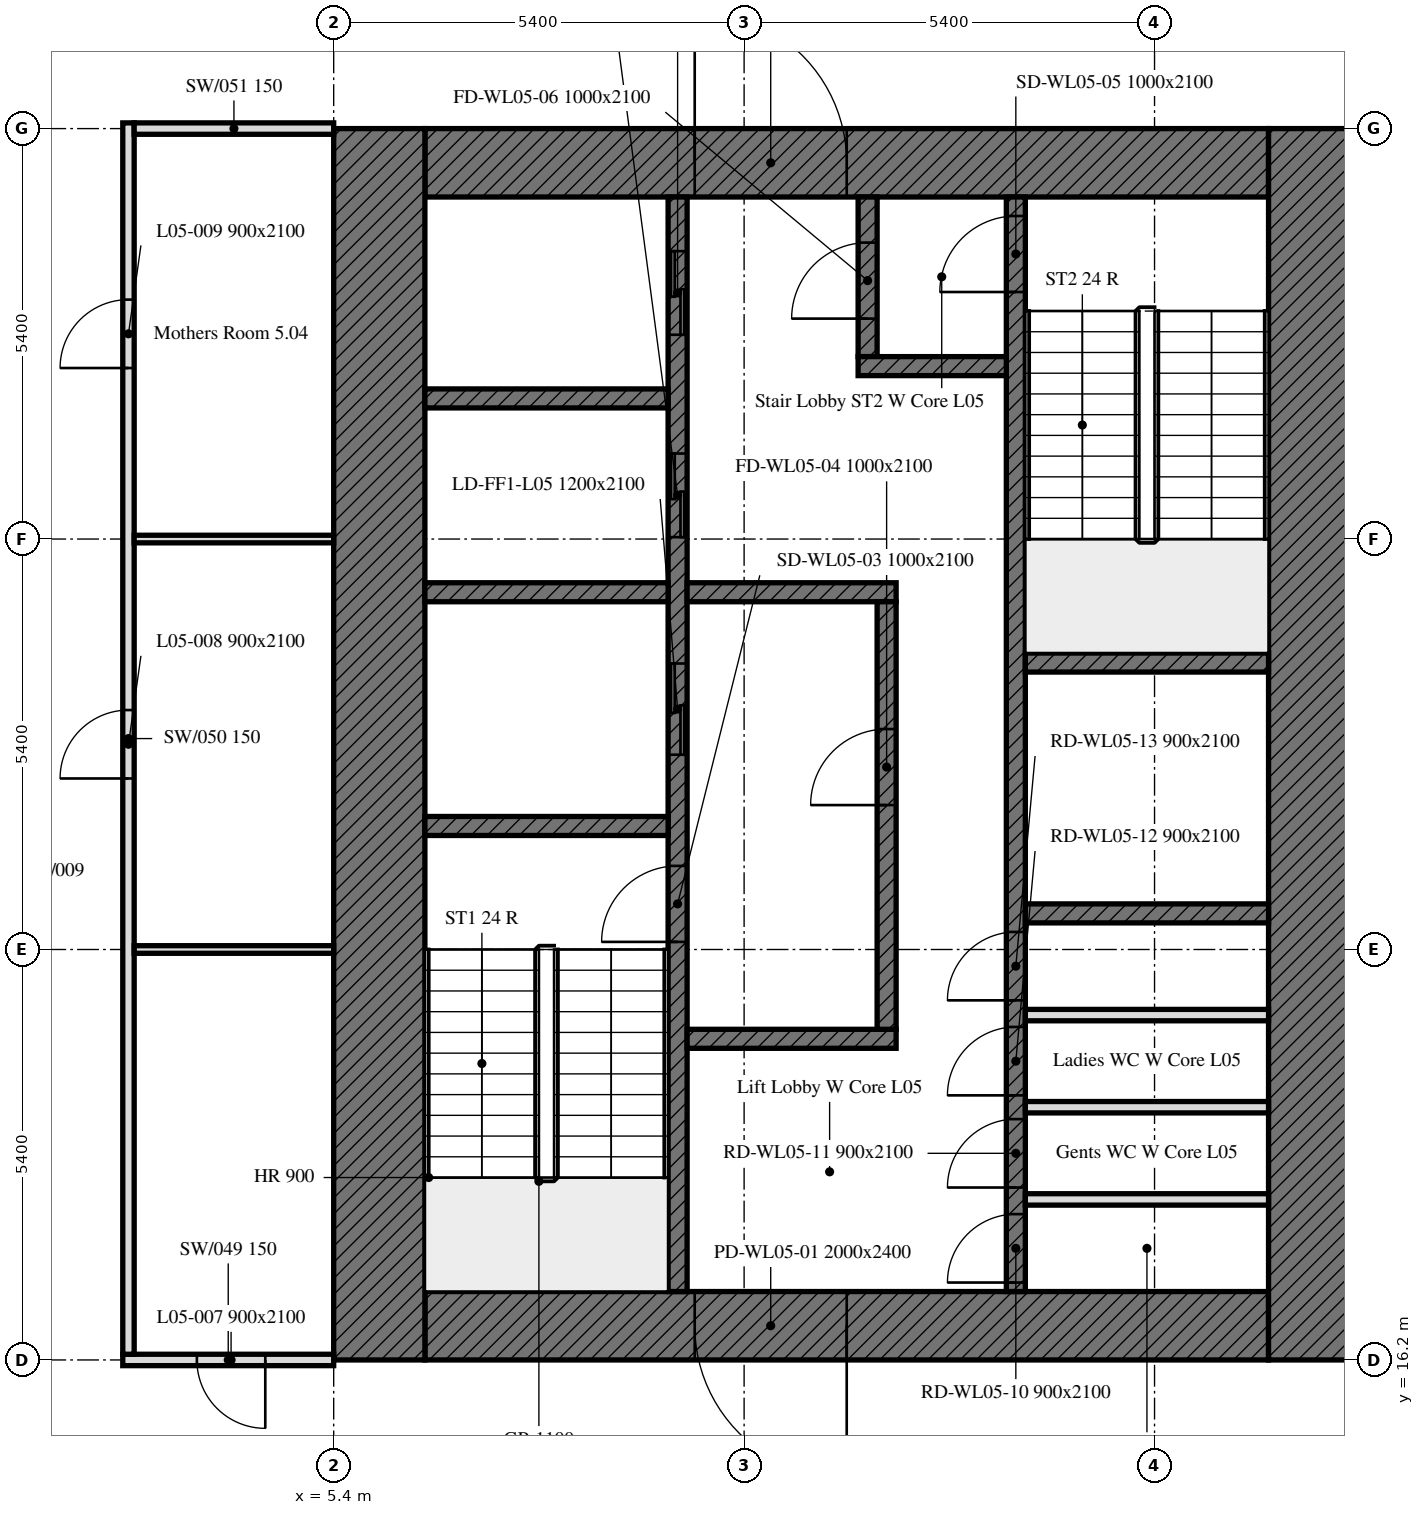
"""IFC4 building model, lengths in metres.
Left out: names, types, materials, properties, quantities, classifications, styles, units other than length and angle.
Written with IfcOpenShell. Run it as: python <this file> out.ifc"""

import sys

from ifc_helpers import new_model, si_unit, direction, frame, frame_2d, origin, place, context, subcontext, project, spatial, rectangle, extrude, element, fill, save


model = new_model("IFC4")
c1 = context("Model", 3, precision=1e-05, world=origin(), true_north=direction((0.0, 1.0)))
c2 = subcontext(c1, "Body", "Model", "MODEL_VIEW")
j1 = project(units=[si_unit("LENGTHUNIT", "METRE"), si_unit("PLANEANGLEUNIT", "RADIAN")], contexts=[c1])
p1 = place(None, origin())
s1 = spatial("IfcSite", under=j1, at=p1, CompositionType="ELEMENT")
p2 = place(p1, origin())
s2 = spatial("IfcBuilding", under=s1, at=p2, CompositionType="ELEMENT")
p3 = place(p2, frame((0.0, 0.0, 29.1)))
s3 = spatial("IfcBuildingStorey", under=s2, at=p3, CompositionType="ELEMENT", Elevation=29.1)
p4 = place(p3, frame((17.7, 16.65, 0.0), z_axis=(0.0, 0.0, 1.0), x_axis=(-1.0, 0.0, 0.0)))
e1 = element("IfcWall", 1, at=p4, inside=s3, PredefinedType="SOLIDWALL", context=c2, shape_type="SweptSolid", body=[
    extrude(rectangle(XDim=11.1, YDim=0.9, at=frame_2d((5.55, 0.0))), origin(), (0.0, 0.0, 1.0), 4.2),
])
p5 = place(p4, frame((5.55, 0.0, 0.0)))
e2 = element("IfcOpeningElement", 2, at=p5, cuts=e1, PredefinedType="OPENING", context=c2, shape_type="SweptSolid", body=[
    extrude(rectangle(XDim=2.0, YDim=2.4, at=frame_2d((1.0, 1.2))), frame((0.0, 0.45, 0.0), z_axis=(0.0, -1.0, 0.0), x_axis=(1.0, 0.0, 0.0)), (0.0, 0.0, 1.0), 0.9),
])
p6 = place(p3, frame((6.6, 31.95, 0.0), z_axis=(0.0, 0.0, 1.0), x_axis=(1.0, 0.0, 0.0)))
e3 = element("IfcWall", 3, at=p6, inside=s3, PredefinedType="SOLIDWALL", context=c2, shape_type="SweptSolid", body=[
    extrude(rectangle(XDim=11.1, YDim=0.9, at=frame_2d((5.55, 0.0))), origin(), (0.0, 0.0, 1.0), 4.2),
])
p7 = place(p6, frame((3.55, 0.0, 0.0)))
e4 = element("IfcOpeningElement", 4, at=p7, cuts=e3, PredefinedType="OPENING", context=c2, shape_type="SweptSolid", body=[
    extrude(rectangle(XDim=2.0, YDim=2.4, at=frame_2d((1.0, 1.2))), frame((0.0, 0.45, 0.0), z_axis=(0.0, -1.0, 0.0), x_axis=(1.0, 0.0, 0.0)), (0.0, 0.0, 1.0), 0.9),
])
for number, where, z_axis, x_axis in (
    (5, (6.0, 16.2, 0.0), (0.0, 0.0, 1.0), (0.0, 1.0, 0.0)),
    (6, (18.3, 32.4, 0.0), (0.0, 0.0, 1.0), (0.0, -1.0, 0.0)),
):
    element("IfcWall", number, at=place(p3, frame(where, z_axis=z_axis, x_axis=x_axis)), inside=s3, PredefinedType="SOLIDWALL", context=c2, shape_type="SweptSolid", body=[
        extrude(rectangle(XDim=16.2, YDim=1.2, at=frame_2d((8.1, 0.0))), origin(), (0.0, 0.0, 1.0), 4.2),
    ])
p8 = place(p3, frame((9.925, 17.1, 0.0), z_axis=(0.0, 0.0, 1.0), x_axis=(0.0, 1.0, 0.0)))
e7 = element("IfcWall", 7, at=p8, inside=s3, PredefinedType="SOLIDWALL", context=c2, shape_type="SweptSolid", body=[
    extrude(rectangle(XDim=14.4, YDim=0.25, at=frame_2d((7.2, 0.0))), origin(), (0.0, 0.0, 1.0), 4.2),
])
p9 = place(p8, frame((4.6, 0.0, 0.0)))
e8 = element("IfcOpeningElement", 8, at=p9, cuts=e7, PredefinedType="OPENING", context=c2, shape_type="SweptSolid", body=[
    extrude(rectangle(XDim=1.0, YDim=2.1, at=frame_2d((0.5, 1.05))), frame((0.0, 0.125, 0.0), z_axis=(0.0, -1.0, 0.0), x_axis=(1.0, 0.0, 0.0)), (0.0, 0.0, 1.0), 0.25),
])
p10 = place(p8, frame((7.062, 0.0, 0.0)))
e9 = element("IfcOpeningElement", 9, at=p10, cuts=e7, PredefinedType="OPENING", context=c2, shape_type="SweptSolid", body=[
    extrude(rectangle(XDim=1.2, YDim=2.1, at=frame_2d((0.6, 1.05))), frame((0.0, 0.125, 0.0), z_axis=(0.0, -1.0, 0.0), x_axis=(1.0, 0.0, 0.0)), (0.0, 0.0, 1.0), 0.25),
])
p11 = place(p8, frame((9.925, 0.0, 0.0)))
e10 = element("IfcOpeningElement", 10, at=p11, cuts=e7, PredefinedType="OPENING", context=c2, shape_type="SweptSolid", body=[
    extrude(rectangle(XDim=1.1, YDim=2.1, at=frame_2d((0.55, 1.05))), frame((0.0, 0.125, 0.0), z_axis=(0.0, -1.0, 0.0), x_axis=(1.0, 0.0, 0.0)), (0.0, 0.0, 1.0), 0.25),
])
p12 = place(p8, frame((12.587, 0.0, 0.0)))
e11 = element("IfcOpeningElement", 11, at=p12, cuts=e7, PredefinedType="OPENING", context=c2, shape_type="SweptSolid", body=[
    extrude(rectangle(XDim=1.1, YDim=2.1, at=frame_2d((0.55, 1.05))), frame((0.0, 0.125, 0.0), z_axis=(0.0, -1.0, 0.0), x_axis=(1.0, 0.0, 0.0)), (0.0, 0.0, 1.0), 0.25),
])
p13 = place(p3, frame((14.375, 17.1, 0.0), z_axis=(0.0, 0.0, 1.0), x_axis=(0.0, 1.0, 0.0)))
e12 = element("IfcWall", 12, at=p13, inside=s3, PredefinedType="SOLIDWALL", context=c2, shape_type="SweptSolid", body=[
    extrude(rectangle(XDim=14.4, YDim=0.25, at=frame_2d((7.2, 0.0))), origin(), (0.0, 0.0, 1.0), 4.2),
])
p14 = place(p13, frame((13.15, 0.0, 0.0)))
e13 = element("IfcOpeningElement", 13, at=p14, cuts=e12, PredefinedType="OPENING", context=c2, shape_type="SweptSolid", body=[
    extrude(rectangle(XDim=1.0, YDim=2.1, at=frame_2d((0.5, 1.05))), frame((0.0, 0.125, 0.0), z_axis=(0.0, -1.0, 0.0), x_axis=(1.0, 0.0, 0.0)), (0.0, 0.0, 1.0), 0.25),
])
p15 = place(p13, frame((0.118, 0.0, 0.0)))
e14 = element("IfcOpeningElement", 14, at=p15, cuts=e12, PredefinedType="OPENING", context=c2, shape_type="SweptSolid", body=[
    extrude(rectangle(XDim=0.9, YDim=2.1, at=frame_2d((0.45, 1.05))), frame((0.0, 0.125, 0.0), z_axis=(0.0, -1.0, 0.0), x_axis=(1.0, 0.0, 0.0)), (0.0, 0.0, 1.0), 0.25),
])
p16 = place(p13, frame((1.368, 0.0, 0.0)))
e15 = element("IfcOpeningElement", 15, at=p16, cuts=e12, PredefinedType="OPENING", context=c2, shape_type="SweptSolid", body=[
    extrude(rectangle(XDim=0.9, YDim=2.1, at=frame_2d((0.45, 1.05))), frame((0.0, 0.125, 0.0), z_axis=(0.0, -1.0, 0.0), x_axis=(1.0, 0.0, 0.0)), (0.0, 0.0, 1.0), 0.25),
])
p17 = place(p13, frame((2.581, 0.0, 0.0)))
e16 = element("IfcOpeningElement", 16, at=p17, cuts=e12, PredefinedType="OPENING", context=c2, shape_type="SweptSolid", body=[
    extrude(rectangle(XDim=0.9, YDim=2.1, at=frame_2d((0.45, 1.05))), frame((0.0, 0.125, 0.0), z_axis=(0.0, -1.0, 0.0), x_axis=(1.0, 0.0, 0.0)), (0.0, 0.0, 1.0), 0.25),
])
p18 = place(p13, frame((3.831, 0.0, 0.0)))
e17 = element("IfcOpeningElement", 17, at=p18, cuts=e12, PredefinedType="OPENING", context=c2, shape_type="SweptSolid", body=[
    extrude(rectangle(XDim=0.9, YDim=2.1, at=frame_2d((0.45, 1.05))), frame((0.0, 0.125, 0.0), z_axis=(0.0, -1.0, 0.0), x_axis=(1.0, 0.0, 0.0)), (0.0, 0.0, 1.0), 0.25),
])
for number, where, z_axis, x_axis in (
    (18, (6.6, 23.225, 0.0), (0.0, 0.0, 1.0), (1.0, 0.0, 0.0)),
    (19, (14.5, 25.375, 0.0), (0.0, 0.0, 1.0), (1.0, 0.0, 0.0)),
    (20, (14.5, 22.075, 0.0), (0.0, 0.0, 1.0), (1.0, 0.0, 0.0)),
    (21, (6.6, 26.3, 0.0), (0.0, 0.0, 1.0), (1.0, 0.0, 0.0)),
):
    element("IfcWall", number, at=place(p3, frame(where, z_axis=z_axis, x_axis=x_axis)), inside=s3, PredefinedType="SOLIDWALL", context=c2, shape_type="SweptSolid", body=[
        extrude(rectangle(XDim=3.2, YDim=0.25, at=frame_2d((1.6, 0.0))), origin(), (0.0, 0.0, 1.0), 4.2),
    ])
for number, where, z_axis, x_axis in (
    (22, (10.05, 26.3, 0.0), (0.0, 0.0, 1.0), (1.0, 0.0, 0.0)),
    (23, (10.05, 20.425, 0.0), (0.0, 0.0, 1.0), (1.0, 0.0, 0.0)),
):
    element("IfcWall", number, at=place(p3, frame(where, z_axis=z_axis, x_axis=x_axis)), inside=s3, PredefinedType="SOLIDWALL", context=c2, shape_type="SweptSolid", body=[
        extrude(rectangle(XDim=2.75, YDim=0.25, at=frame_2d((1.375, 0.0))), origin(), (0.0, 0.0, 1.0), 4.2),
    ])
p19 = place(p3, frame((12.425, 29.4, 0.0), z_axis=(0.0, 0.0, 1.0), x_axis=(0.0, 1.0, 0.0)))
e24 = element("IfcWall", 24, at=p19, inside=s3, PredefinedType="SOLIDWALL", context=c2, shape_type="SweptSolid", body=[
    extrude(rectangle(XDim=2.1, YDim=0.25, at=frame_2d((1.05, 0.0))), origin(), (0.0, 0.0, 1.0), 4.2),
])
p20 = place(p19, frame((0.5, 0.0, 0.0)))
e25 = element("IfcOpeningElement", 25, at=p20, cuts=e24, PredefinedType="OPENING", context=c2, shape_type="SweptSolid", body=[
    extrude(rectangle(XDim=1.0, YDim=2.1, at=frame_2d((0.5, 1.05))), frame((0.0, 0.125, 0.0), z_axis=(0.0, -1.0, 0.0), x_axis=(1.0, 0.0, 0.0)), (0.0, 0.0, 1.0), 0.25),
])
p21 = place(p3, frame((12.3, 29.275, 0.0), z_axis=(0.0, 0.0, 1.0), x_axis=(1.0, 0.0, 0.0)))
e26 = element("IfcWall", 26, at=p21, inside=s3, PredefinedType="SOLIDWALL", context=c2, shape_type="SweptSolid", body=[
    extrude(rectangle(XDim=1.95, YDim=0.25, at=frame_2d((0.975, 0.0))), origin(), (0.0, 0.0, 1.0), 4.2),
])
p22 = place(p3, frame((12.675, 20.55, 0.0), z_axis=(0.0, 0.0, 1.0), x_axis=(0.0, 1.0, 0.0)))
e27 = element("IfcWall", 27, at=p22, inside=s3, PredefinedType="SOLIDWALL", context=c2, shape_type="SweptSolid", body=[
    extrude(rectangle(XDim=5.625, YDim=0.25, at=frame_2d((2.812, 0.0))), origin(), (0.0, 0.0, 1.0), 4.2),
])
p23 = place(p22, frame((2.95, 0.0, 0.0)))
e28 = element("IfcOpeningElement", 28, at=p23, cuts=e27, PredefinedType="OPENING", context=c2, shape_type="SweptSolid", body=[
    extrude(rectangle(XDim=1.0, YDim=2.1, at=frame_2d((0.5, 1.05))), frame((0.0, 0.125, 0.0), z_axis=(0.0, -1.0, 0.0), x_axis=(1.0, 0.0, 0.0)), (0.0, 0.0, 1.0), 0.25),
])
p24 = place(p3, frame((6.6, 28.85, 0.0), z_axis=(0.0, 0.0, 1.0), x_axis=(1.0, 0.0, 0.0)))
e29 = element("IfcWall", 29, at=p24, inside=s3, PredefinedType="SOLIDWALL", context=c2, shape_type="SweptSolid", body=[
    extrude(rectangle(XDim=3.2, YDim=0.25, at=frame_2d((1.6, 0.0))), origin(), (0.0, 0.0, 1.0), 4.2),
])
for number, where, z_axis, x_axis in (
    (30, (14.5, 18.312, 0.0), (0.0, 0.0, 1.0), (1.0, 0.0, 0.0)),
    (31, (14.5, 19.525, 0.0), (0.0, 0.0, 1.0), (1.0, 0.0, 0.0)),
    (32, (14.5, 20.737, 0.0), (0.0, 0.0, 1.0), (1.0, 0.0, 0.0)),
):
    element("IfcWall", number, at=place(p3, frame(where, z_axis=z_axis, x_axis=x_axis)), inside=s3, PredefinedType="PARTITIONING", context=c2, shape_type="SweptSolid", body=[
        extrude(rectangle(XDim=3.2, YDim=0.15, at=frame_2d((1.6, 0.0))), origin(), (0.0, 0.0, 1.0), 4.2),
    ])
p25 = place(p3, frame((5.4, 16.2, 0.0), z_axis=(0.0, 0.0, 1.0), x_axis=(-1.0, 0.0, 0.0)))
e33 = element("IfcWall", 33, at=p25, inside=s3, PredefinedType="PARTITIONING", context=c2, shape_type="SweptSolid", body=[
    extrude(rectangle(XDim=2.775, YDim=0.15, at=frame_2d((1.387, 0.0))), origin(), (0.0, 0.0, 1.0), 3.45),
])
p26 = place(p25, frame((0.9, 0.0, 0.0)))
e34 = element("IfcOpeningElement", 34, at=p26, cuts=e33, PredefinedType="OPENING", context=c2, shape_type="SweptSolid", body=[
    extrude(rectangle(XDim=0.9, YDim=2.1, at=frame_2d((0.45, 1.05))), frame((0.0, 0.075, 0.0), z_axis=(0.0, -1.0, 0.0), x_axis=(1.0, 0.0, 0.0)), (0.0, 0.0, 1.0), 0.15),
])
p27 = place(p3, frame((2.7, 16.275, 0.0), z_axis=(0.0, 0.0, 1.0), x_axis=(0.0, 1.0, 0.0)))
e35 = element("IfcWall", 35, at=p27, inside=s3, PredefinedType="PARTITIONING", context=c2, shape_type="SweptSolid", body=[
    extrude(rectangle(XDim=16.2, YDim=0.15, at=frame_2d((8.1, 0.0))), origin(), (0.0, 0.0, 1.0), 3.45),
])
p28 = place(p27, frame((7.575, 0.0, 0.0)))
e36 = element("IfcOpeningElement", 36, at=p28, cuts=e35, PredefinedType="OPENING", context=c2, shape_type="SweptSolid", body=[
    extrude(rectangle(XDim=0.9, YDim=2.1, at=frame_2d((0.45, 1.05))), frame((0.0, 0.075, 0.0), z_axis=(0.0, -1.0, 0.0), x_axis=(1.0, 0.0, 0.0)), (0.0, 0.0, 1.0), 0.15),
])
p29 = place(p27, frame((12.975, 0.0, 0.0)))
e37 = element("IfcOpeningElement", 37, at=p29, cuts=e35, PredefinedType="OPENING", context=c2, shape_type="SweptSolid", body=[
    extrude(rectangle(XDim=0.9, YDim=2.1, at=frame_2d((0.45, 1.05))), frame((0.0, 0.075, 0.0), z_axis=(0.0, -1.0, 0.0), x_axis=(1.0, 0.0, 0.0)), (0.0, 0.0, 1.0), 0.15),
])
p30 = place(p3, frame((2.775, 32.4, 0.0), z_axis=(0.0, 0.0, 1.0), x_axis=(1.0, 0.0, 0.0)))
e38 = element("IfcWall", 38, at=p30, inside=s3, PredefinedType="PARTITIONING", context=c2, shape_type="SweptSolid", body=[
    extrude(rectangle(XDim=2.625, YDim=0.15, at=frame_2d((1.312, 0.0))), origin(), (0.0, 0.0, 1.0), 3.45),
])
for number, where, z_axis, x_axis in (
    (39, (5.4, 21.6, 0.0), (0.0, 0.0, 1.0), (-1.0, 0.0, 0.0)),
    (40, (5.4, 27.0, 0.0), (0.0, 0.0, 1.0), (-1.0, 0.0, 0.0)),
):
    element("IfcWall", number, at=place(p3, frame(where, z_axis=z_axis, x_axis=x_axis)), inside=s3, PredefinedType="PARTITIONING", context=c2, shape_type="SweptSolid", body=[
        extrude(rectangle(XDim=2.625, YDim=0.1, at=frame_2d((1.312, 0.0))), origin(), (0.0, 0.0, 1.0), 3.45),
    ])
p31 = place(p5, origin())
e41 = element("IfcDoor", 41, at=p31, inside=s3, OperationType="DOUBLE_DOOR_SINGLE_SWING", PredefinedType="DOOR", context=c2, shape_type="SweptSolid", body=[
    extrude(rectangle(XDim=2.0, YDim=2.4, at=frame_2d((1.0, 1.2))), frame((0.0, 0.025, 0.0), z_axis=(0.0, -1.0, 0.0), x_axis=(1.0, 0.0, 0.0)), (0.0, 0.0, 1.0), 0.05),
])
fill(e2, e41)
p32 = place(p7, origin())
e42 = element("IfcDoor", 42, at=p32, inside=s3, OperationType="DOUBLE_DOOR_SINGLE_SWING", PredefinedType="DOOR", context=c2, shape_type="SweptSolid", body=[
    extrude(rectangle(XDim=2.0, YDim=2.4, at=frame_2d((1.0, 1.2))), frame((0.0, 0.025, 0.0), z_axis=(0.0, -1.0, 0.0), x_axis=(1.0, 0.0, 0.0)), (0.0, 0.0, 1.0), 0.05),
])
fill(e4, e42)
p33 = place(p9, origin())
e43 = element("IfcDoor", 43, at=p33, inside=s3, OperationType="SINGLE_SWING_LEFT", PredefinedType="DOOR", context=c2, shape_type="SweptSolid", body=[
    extrude(rectangle(XDim=1.0, YDim=2.1, at=frame_2d((0.5, 1.05))), frame((0.0, 0.025, 0.0), z_axis=(0.0, -1.0, 0.0), x_axis=(1.0, 0.0, 0.0)), (0.0, 0.0, 1.0), 0.05),
])
fill(e8, e43)
p34 = place(p23, origin())
e44 = element("IfcDoor", 44, at=p34, inside=s3, OperationType="SINGLE_SWING_LEFT", PredefinedType="DOOR", context=c2, shape_type="SweptSolid", body=[
    extrude(rectangle(XDim=1.0, YDim=2.1, at=frame_2d((0.5, 1.05))), frame((0.0, 0.025, 0.0), z_axis=(0.0, -1.0, 0.0), x_axis=(1.0, 0.0, 0.0)), (0.0, 0.0, 1.0), 0.05),
])
fill(e28, e44)
p35 = place(p14, origin())
e45 = element("IfcDoor", 45, at=p35, inside=s3, OperationType="SINGLE_SWING_LEFT", PredefinedType="DOOR", context=c2, shape_type="SweptSolid", body=[
    extrude(rectangle(XDim=1.0, YDim=2.1, at=frame_2d((0.5, 1.05))), frame((0.0, 0.025, 0.0), z_axis=(0.0, -1.0, 0.0), x_axis=(1.0, 0.0, 0.0)), (0.0, 0.0, 1.0), 0.05),
])
fill(e13, e45)
p36 = place(p20, origin())
e46 = element("IfcDoor", 46, at=p36, inside=s3, OperationType="SINGLE_SWING_LEFT", PredefinedType="DOOR", context=c2, shape_type="SweptSolid", body=[
    extrude(rectangle(XDim=1.0, YDim=2.1, at=frame_2d((0.5, 1.05))), frame((0.0, 0.025, 0.0), z_axis=(0.0, -1.0, 0.0), x_axis=(1.0, 0.0, 0.0)), (0.0, 0.0, 1.0), 0.05),
])
fill(e25, e46)
p37 = place(p10, origin())
e47 = element("IfcDoor", 47, at=p37, inside=s3, OperationType="DOUBLE_DOOR_SLIDING", PredefinedType="DOOR", context=c2, shape_type="SweptSolid", body=[
    extrude(rectangle(XDim=1.2, YDim=2.1, at=frame_2d((0.6, 1.05))), frame((0.0, 0.025, 0.0), z_axis=(0.0, -1.0, 0.0), x_axis=(1.0, 0.0, 0.0)), (0.0, 0.0, 1.0), 0.05),
])
fill(e9, e47)
p38 = place(p11, origin())
e48 = element("IfcDoor", 48, at=p38, inside=s3, OperationType="DOUBLE_DOOR_SLIDING", PredefinedType="DOOR", context=c2, shape_type="SweptSolid", body=[
    extrude(rectangle(XDim=1.1, YDim=2.1, at=frame_2d((0.55, 1.05))), frame((0.0, 0.025, 0.0), z_axis=(0.0, -1.0, 0.0), x_axis=(1.0, 0.0, 0.0)), (0.0, 0.0, 1.0), 0.05),
])
fill(e10, e48)
p39 = place(p12, origin())
e49 = element("IfcDoor", 49, at=p39, inside=s3, OperationType="DOUBLE_DOOR_SLIDING", PredefinedType="DOOR", context=c2, shape_type="SweptSolid", body=[
    extrude(rectangle(XDim=1.1, YDim=2.1, at=frame_2d((0.55, 1.05))), frame((0.0, 0.025, 0.0), z_axis=(0.0, -1.0, 0.0), x_axis=(1.0, 0.0, 0.0)), (0.0, 0.0, 1.0), 0.05),
])
fill(e11, e49)
p40 = place(p15, origin())
e50 = element("IfcDoor", 50, at=p40, inside=s3, OperationType="SINGLE_SWING_LEFT", PredefinedType="DOOR", context=c2, shape_type="SweptSolid", body=[
    extrude(rectangle(XDim=0.9, YDim=2.1, at=frame_2d((0.45, 1.05))), frame((0.0, 0.025, 0.0), z_axis=(0.0, -1.0, 0.0), x_axis=(1.0, 0.0, 0.0)), (0.0, 0.0, 1.0), 0.05),
])
fill(e14, e50)
p41 = place(p16, origin())
e51 = element("IfcDoor", 51, at=p41, inside=s3, OperationType="SINGLE_SWING_LEFT", PredefinedType="DOOR", context=c2, shape_type="SweptSolid", body=[
    extrude(rectangle(XDim=0.9, YDim=2.1, at=frame_2d((0.45, 1.05))), frame((0.0, 0.025, 0.0), z_axis=(0.0, -1.0, 0.0), x_axis=(1.0, 0.0, 0.0)), (0.0, 0.0, 1.0), 0.05),
])
fill(e15, e51)
p42 = place(p17, origin())
e52 = element("IfcDoor", 52, at=p42, inside=s3, OperationType="SINGLE_SWING_LEFT", PredefinedType="DOOR", context=c2, shape_type="SweptSolid", body=[
    extrude(rectangle(XDim=0.9, YDim=2.1, at=frame_2d((0.45, 1.05))), frame((0.0, 0.025, 0.0), z_axis=(0.0, -1.0, 0.0), x_axis=(1.0, 0.0, 0.0)), (0.0, 0.0, 1.0), 0.05),
])
fill(e16, e52)
p43 = place(p18, origin())
e53 = element("IfcDoor", 53, at=p43, inside=s3, OperationType="SINGLE_SWING_LEFT", PredefinedType="DOOR", context=c2, shape_type="SweptSolid", body=[
    extrude(rectangle(XDim=0.9, YDim=2.1, at=frame_2d((0.45, 1.05))), frame((0.0, 0.025, 0.0), z_axis=(0.0, -1.0, 0.0), x_axis=(1.0, 0.0, 0.0)), (0.0, 0.0, 1.0), 0.05),
])
fill(e17, e53)
p44 = place(p26, origin())
e54 = element("IfcDoor", 54, at=p44, inside=s3, OperationType="SINGLE_SWING_LEFT", PredefinedType="DOOR", context=c2, shape_type="SweptSolid", body=[
    extrude(rectangle(XDim=0.9, YDim=2.1, at=frame_2d((0.45, 1.05))), frame((0.0, 0.025, 0.0), z_axis=(0.0, -1.0, 0.0), x_axis=(1.0, 0.0, 0.0)), (0.0, 0.0, 1.0), 0.05),
])
fill(e34, e54)
p45 = place(p28, origin())
e55 = element("IfcDoor", 55, at=p45, inside=s3, OperationType="SINGLE_SWING_LEFT", PredefinedType="DOOR", context=c2, shape_type="SweptSolid", body=[
    extrude(rectangle(XDim=0.9, YDim=2.1, at=frame_2d((0.45, 1.05))), frame((0.0, 0.025, 0.0), z_axis=(0.0, -1.0, 0.0), x_axis=(1.0, 0.0, 0.0)), (0.0, 0.0, 1.0), 0.05),
])
fill(e36, e55)
p46 = place(p29, origin())
e56 = element("IfcDoor", 56, at=p46, inside=s3, OperationType="SINGLE_SWING_LEFT", PredefinedType="DOOR", context=c2, shape_type="SweptSolid", body=[
    extrude(rectangle(XDim=0.9, YDim=2.1, at=frame_2d((0.45, 1.05))), frame((0.0, 0.025, 0.0), z_axis=(0.0, -1.0, 0.0), x_axis=(1.0, 0.0, 0.0)), (0.0, 0.0, 1.0), 0.05),
])
fill(e37, e56)
save(model, sys.argv[1])
